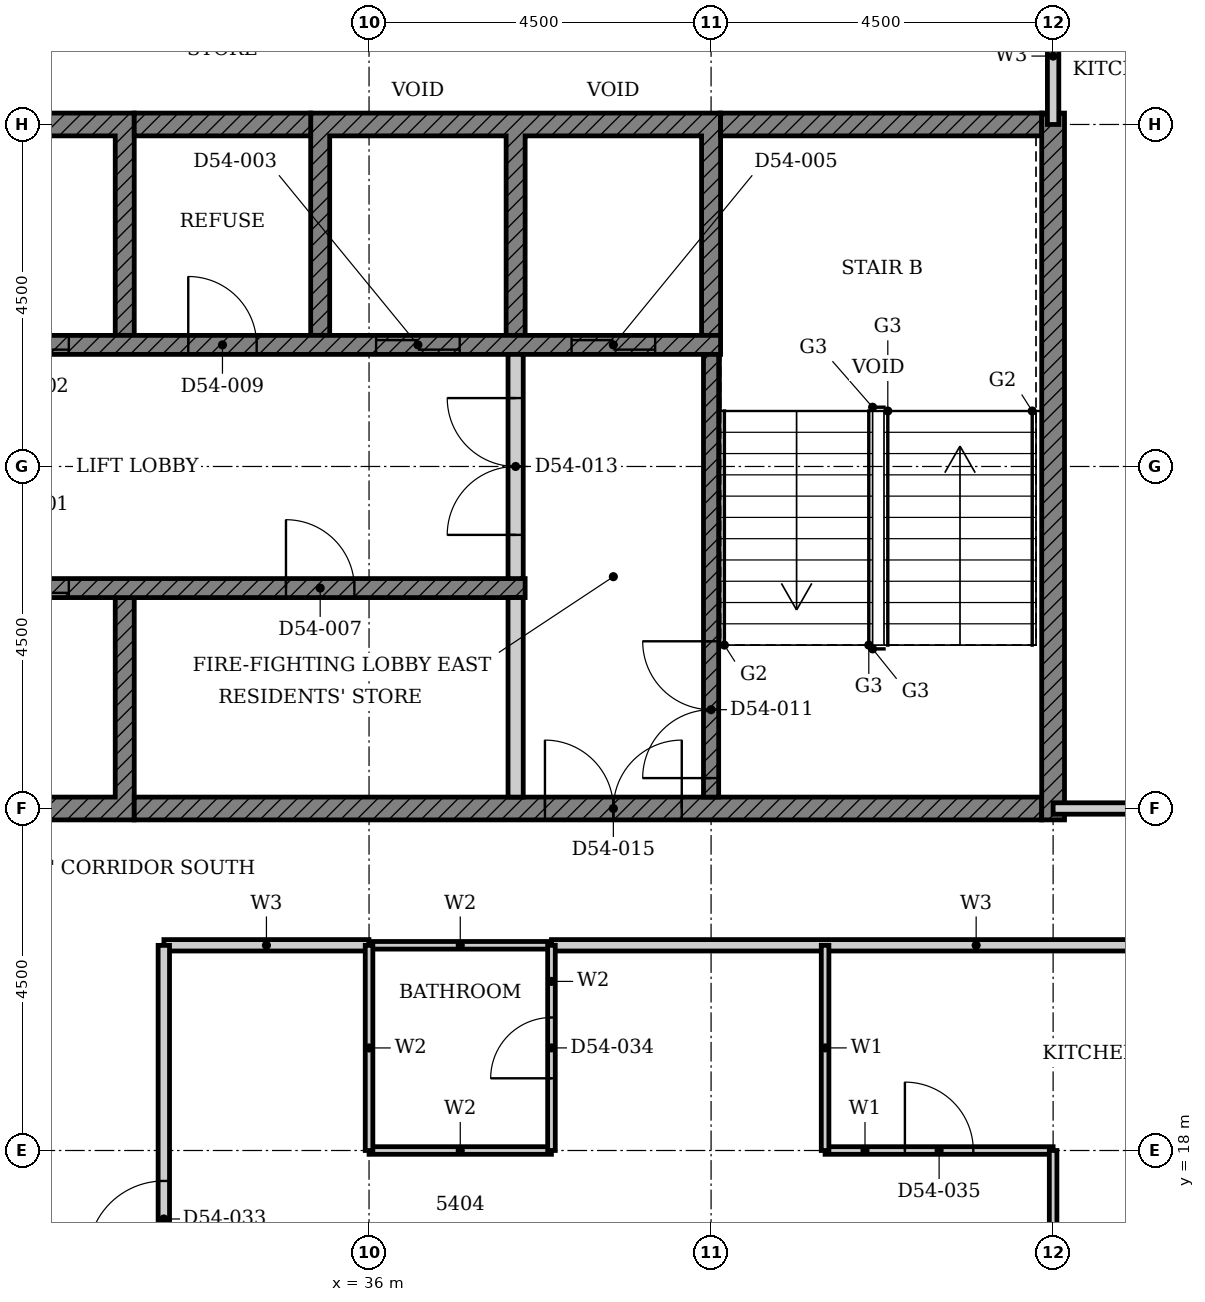
"""IFC4 building model, lengths in metres.
Left out: names, types, materials, properties, quantities, classifications, styles, units other than length and angle.
Written with IfcOpenShell. Run it as: python <this file> out.ifc"""

import sys

from ifc_helpers import new_model, si_unit, direction, frame, frame_2d, origin, place, context, subcontext, project, spatial, polyline, rectangle, outline, extrude, element, fill, save


model = new_model("IFC4")
c1 = context("Model", 3, precision=1e-05, world=origin(), true_north=direction((0.0, 1.0)))
c2 = subcontext(c1, "Body", "Model", "MODEL_VIEW")
j1 = project(units=[si_unit("LENGTHUNIT", "METRE"), si_unit("PLANEANGLEUNIT", "RADIAN")], contexts=[c1])
p1 = place(None, origin())
s1 = spatial("IfcSite", under=j1, at=p1, CompositionType="ELEMENT")
p2 = place(p1, origin())
s2 = spatial("IfcBuilding", under=s1, at=p2, CompositionType="ELEMENT")
p3 = place(p2, frame((0.0, 0.0, 214.6)))
s3 = spatial("IfcBuildingStorey", under=s2, at=p3, CompositionType="ELEMENT", Elevation=214.6)
p4 = place(p3, origin())
e1 = element("IfcWall", 1, at=p4, inside=s3, PredefinedType="SHEAR", context=c2, shape_type="SweptSolid", body=[
    extrude(outline(polyline([(27.518, 22.35), (32.911, 22.35), (32.911, 25.275), (32.661, 25.275), (32.661, 22.65), (30.339, 22.65), (30.339, 25.275), (30.089, 25.275), (30.089, 22.65), (27.768, 22.65), (27.768, 25.275), (27.518, 25.275), (27.518, 22.35)])), origin(), (0.0, 0.0, 1.0), 3.4),
])
p5 = place(p3, origin())
e2 = element("IfcWall", 2, at=p5, inside=s3, PredefinedType="SHEAR", context=c2, shape_type="SweptSolid", body=[
    extrude(outline(polyline([(27.518, 28.725), (27.768, 28.725), (27.768, 31.35), (30.089, 31.35), (30.089, 28.725), (30.339, 28.725), (30.339, 31.35), (32.661, 31.35), (32.661, 28.725), (32.911, 28.725), (32.911, 31.65), (27.518, 31.65), (27.518, 28.725)])), origin(), (0.0, 0.0, 1.0), 3.4),
])
p6 = place(p3, origin())
e3 = element("IfcWall", 3, at=p6, inside=s3, PredefinedType="SHEAR", context=c2, shape_type="SweptSolid", body=[
    extrude(outline(polyline([(35.232, 28.725), (35.482, 28.725), (35.482, 31.35), (37.803, 31.35), (37.803, 28.725), (38.053, 28.725), (38.053, 31.35), (40.375, 31.35), (40.375, 28.725), (40.625, 28.725), (40.625, 31.65), (35.232, 31.65), (35.232, 28.725)])), origin(), (0.0, 0.0, 1.0), 3.4),
])
p7 = place(p3, frame((32.911, 22.5, 0.0), z_axis=(0.0, 0.0, 1.0), x_axis=(1.0, 0.0, 0.0)))
e4 = element("IfcWall", 4, at=p7, inside=s3, PredefinedType="SHEAR", context=c2, shape_type="SweptSolid", body=[
    extrude(rectangle(XDim=11.939, YDim=0.3, at=frame_2d((5.97, 0.0))), origin(), (0.0, 0.0, 1.0), 3.4),
])
p8 = place(p7, frame((5.404, 0.0, 0.0)))
e5 = element("IfcOpeningElement", 5, at=p8, cuts=e4, PredefinedType="OPENING", context=c2, shape_type="SweptSolid", body=[
    extrude(rectangle(XDim=1.8, YDim=2.1, at=frame_2d((0.9, 1.05))), frame((0.0, 0.16, 0.0), z_axis=(0.0, -1.0, 0.0), x_axis=(1.0, 0.0, 0.0)), (0.0, 0.0, 1.0), 0.32),
])
p9 = place(p3, frame((32.911, 31.5, 0.0), z_axis=(0.0, 0.0, 1.0), x_axis=(1.0, 0.0, 0.0)))
e6 = element("IfcWall", 6, at=p9, inside=s3, PredefinedType="SHEAR", context=c2, shape_type="SweptSolid", body=[
    extrude(rectangle(XDim=2.322, YDim=0.3, at=frame_2d((1.161, 0.0))), origin(), (0.0, 0.0, 1.0), 3.4),
])
p10 = place(p3, frame((40.625, 31.5, 0.0), z_axis=(0.0, 0.0, 1.0), x_axis=(1.0, 0.0, 0.0)))
e7 = element("IfcWall", 7, at=p10, inside=s3, PredefinedType="SHEAR", context=c2, shape_type="SweptSolid", body=[
    extrude(rectangle(XDim=4.225, YDim=0.3, at=frame_2d((2.113, 0.0))), origin(), (0.0, 0.0, 1.0), 3.4),
])
p11 = place(p3, frame((45.0, 22.35, 0.0), z_axis=(0.0, 0.0, 1.0), x_axis=(0.0, 1.0, 0.0)))
e8 = element("IfcWall", 8, at=p11, inside=s3, PredefinedType="SHEAR", context=c2, shape_type="SweptSolid", body=[
    extrude(rectangle(XDim=9.3, YDim=0.3, at=frame_2d((4.65, 0.0))), origin(), (0.0, 0.0, 1.0), 3.4),
])
p12 = place(p3, frame((22.375, 25.4, 0.0), z_axis=(0.0, 0.0, 1.0), x_axis=(1.0, 0.0, 0.0)))
e9 = element("IfcWall", 9, at=p12, inside=s3, PredefinedType="SHEAR", context=c2, shape_type="SweptSolid", body=[
    extrude(rectangle(XDim=15.678, YDim=0.25, at=frame_2d((7.839, 0.0))), origin(), (0.0, 0.0, 1.0), 3.4),
])
p13 = place(p12, frame((8.575, 0.0, 0.0)))
e10 = element("IfcOpeningElement", 10, at=p13, cuts=e9, PredefinedType="OPENING", context=c2, shape_type="SweptSolid", body=[
    extrude(rectangle(XDim=1.1, YDim=2.1, at=frame_2d((0.55, 1.05))), frame((0.0, 0.135, 0.0), z_axis=(0.0, -1.0, 0.0), x_axis=(1.0, 0.0, 0.0)), (0.0, 0.0, 1.0), 0.27),
])
p14 = place(p12, frame((0.861, 0.0, 0.0)))
e11 = element("IfcOpeningElement", 11, at=p14, cuts=e9, PredefinedType="OPENING", context=c2, shape_type="SweptSolid", body=[
    extrude(rectangle(XDim=1.1, YDim=2.1, at=frame_2d((0.55, 1.05))), frame((0.0, 0.135, 0.0), z_axis=(0.0, -1.0, 0.0), x_axis=(1.0, 0.0, 0.0)), (0.0, 0.0, 1.0), 0.27),
])
p15 = place(p12, frame((3.532, 0.0, 0.0)))
e12 = element("IfcOpeningElement", 12, at=p15, cuts=e9, PredefinedType="OPENING", context=c2, shape_type="SweptSolid", body=[
    extrude(rectangle(XDim=0.9, YDim=2.1, at=frame_2d((0.45, 1.05))), frame((0.0, 0.135, 0.0), z_axis=(0.0, -1.0, 0.0), x_axis=(1.0, 0.0, 0.0)), (0.0, 0.0, 1.0), 0.27),
])
p16 = place(p12, frame((12.532, 0.0, 0.0)))
e13 = element("IfcOpeningElement", 13, at=p16, cuts=e9, PredefinedType="OPENING", context=c2, shape_type="SweptSolid", body=[
    extrude(rectangle(XDim=0.9, YDim=2.1, at=frame_2d((0.45, 1.05))), frame((0.0, 0.135, 0.0), z_axis=(0.0, -1.0, 0.0), x_axis=(1.0, 0.0, 0.0)), (0.0, 0.0, 1.0), 0.27),
])
p17 = place(p3, frame((24.947, 28.6, 0.0), z_axis=(0.0, 0.0, 1.0), x_axis=(1.0, 0.0, 0.0)))
e14 = element("IfcWall", 14, at=p17, inside=s3, PredefinedType="SHEAR", context=c2, shape_type="SweptSolid", body=[
    extrude(rectangle(XDim=15.678, YDim=0.25, at=frame_2d((7.839, 0.0))), origin(), (0.0, 0.0, 1.0), 3.4),
])
p18 = place(p17, frame((6.004, 0.0, 0.0)))
e15 = element("IfcOpeningElement", 15, at=p18, cuts=e14, PredefinedType="OPENING", context=c2, shape_type="SweptSolid", body=[
    extrude(rectangle(XDim=1.1, YDim=2.1, at=frame_2d((0.55, 1.05))), frame((0.0, 0.135, 0.0), z_axis=(0.0, -1.0, 0.0), x_axis=(1.0, 0.0, 0.0)), (0.0, 0.0, 1.0), 0.27),
])
p19 = place(p17, frame((11.146, 0.0, 0.0)))
e16 = element("IfcOpeningElement", 16, at=p19, cuts=e14, PredefinedType="OPENING", context=c2, shape_type="SweptSolid", body=[
    extrude(rectangle(XDim=1.1, YDim=2.1, at=frame_2d((0.55, 1.05))), frame((0.0, 0.135, 0.0), z_axis=(0.0, -1.0, 0.0), x_axis=(1.0, 0.0, 0.0)), (0.0, 0.0, 1.0), 0.27),
])
p20 = place(p17, frame((13.718, 0.0, 0.0)))
e17 = element("IfcOpeningElement", 17, at=p20, cuts=e14, PredefinedType="OPENING", context=c2, shape_type="SweptSolid", body=[
    extrude(rectangle(XDim=1.1, YDim=2.1, at=frame_2d((0.55, 1.05))), frame((0.0, 0.135, 0.0), z_axis=(0.0, -1.0, 0.0), x_axis=(1.0, 0.0, 0.0)), (0.0, 0.0, 1.0), 0.27),
])
p21 = place(p17, frame((0.961, 0.0, 0.0)))
e18 = element("IfcOpeningElement", 18, at=p21, cuts=e14, PredefinedType="OPENING", context=c2, shape_type="SweptSolid", body=[
    extrude(rectangle(XDim=0.9, YDim=2.1, at=frame_2d((0.45, 1.05))), frame((0.0, 0.135, 0.0), z_axis=(0.0, -1.0, 0.0), x_axis=(1.0, 0.0, 0.0)), (0.0, 0.0, 1.0), 0.27),
])
p22 = place(p17, frame((8.675, 0.0, 0.0)))
e19 = element("IfcOpeningElement", 19, at=p22, cuts=e14, PredefinedType="OPENING", context=c2, shape_type="SweptSolid", body=[
    extrude(rectangle(XDim=0.9, YDim=2.1, at=frame_2d((0.45, 1.05))), frame((0.0, 0.135, 0.0), z_axis=(0.0, -1.0, 0.0), x_axis=(1.0, 0.0, 0.0)), (0.0, 0.0, 1.0), 0.27),
])
p23 = place(p3, frame((37.928, 22.65, 0.0), z_axis=(0.0, 0.0, 1.0), x_axis=(0.0, 1.0, 0.0)))
e20 = element("IfcWall", 20, at=p23, inside=s3, PredefinedType="PARTITIONING", context=c2, shape_type="SweptSolid", body=[
    extrude(rectangle(XDim=2.625, YDim=0.2, at=frame_2d((1.312, 0.0))), origin(), (0.0, 0.0, 1.0), 3.4),
])
p24 = place(p3, frame((40.5, 22.65, 0.0), z_axis=(0.0, 0.0, 1.0), x_axis=(0.0, 1.0, 0.0)))
e21 = element("IfcWall", 21, at=p24, inside=s3, PredefinedType="SHEAR", context=c2, shape_type="SweptSolid", body=[
    extrude(rectangle(XDim=5.825, YDim=0.2, at=frame_2d((2.913, 0.0))), origin(), (0.0, 0.0, 1.0), 3.4),
])
p25 = place(p24, frame((0.25, 0.0, 0.0)))
e22 = element("IfcOpeningElement", 22, at=p25, cuts=e21, PredefinedType="OPENING", context=c2, shape_type="SweptSolid", body=[
    extrude(rectangle(XDim=1.8, YDim=2.1, at=frame_2d((0.9, 1.05))), frame((0.0, 0.11, 0.0), z_axis=(0.0, -1.0, 0.0), x_axis=(1.0, 0.0, 0.0)), (0.0, 0.0, 1.0), 0.22),
])
p26 = place(p3, frame((37.928, 25.525, 0.0), z_axis=(0.0, 0.0, 1.0), x_axis=(0.0, 1.0, 0.0)))
e23 = element("IfcWall", 23, at=p26, inside=s3, PredefinedType="PARTITIONING", context=c2, shape_type="SweptSolid", body=[
    extrude(rectangle(XDim=2.95, YDim=0.2, at=frame_2d((1.475, 0.0))), origin(), (0.0, 0.0, 1.0), 3.4),
])
p27 = place(p26, frame((0.575, 0.0, 0.0)))
e24 = element("IfcOpeningElement", 24, at=p27, cuts=e23, PredefinedType="OPENING", context=c2, shape_type="SweptSolid", body=[
    extrude(rectangle(XDim=1.8, YDim=2.1, at=frame_2d((0.9, 1.05))), frame((0.0, 0.11, 0.0), z_axis=(0.0, -1.0, 0.0), x_axis=(1.0, 0.0, 0.0)), (0.0, 0.0, 1.0), 0.22),
])
p28 = place(p3, frame((33.301, 20.7, 0.0), z_axis=(0.0, 0.0, 1.0), x_axis=(1.0, 0.0, 0.0)))
e25 = element("IfcWall", 25, at=p28, inside=s3, PredefinedType="PARTITIONING", context=c2, shape_type="SweptSolid", body=[
    extrude(rectangle(XDim=2.698, YDim=0.15, at=frame_2d((1.349, 0.0))), origin(), (0.0, 0.0, 1.0), 3.4),
])
p29 = place(p3, frame((38.4, 20.7, 0.0), z_axis=(0.0, 0.0, 1.0), x_axis=(1.0, 0.0, 0.0)))
e26 = element("IfcWall", 26, at=p29, inside=s3, PredefinedType="PARTITIONING", context=c2, shape_type="SweptSolid", body=[
    extrude(rectangle(XDim=11.175, YDim=0.15, at=frame_2d((5.587, 0.0))), origin(), (0.0, 0.0, 1.0), 3.4),
])
p30 = place(p3, frame((45.0, 22.5, 0.0), z_axis=(0.0, 0.0, 1.0), x_axis=(1.0, 0.0, 0.0)))
e27 = element("IfcWall", 27, at=p30, inside=s3, PredefinedType="PARTITIONING", context=c2, shape_type="SweptSolid", body=[
    extrude(rectangle(XDim=4.765, YDim=0.15, at=frame_2d((2.382, 0.0))), origin(), (0.0, 0.0, 1.0), 3.4),
])
p31 = place(p30, frame((1.75, 0.0, 0.0)))
e28 = element("IfcOpeningElement", 28, at=p31, cuts=e27, PredefinedType="OPENING", context=c2, shape_type="SweptSolid", body=[
    extrude(rectangle(XDim=1.0, YDim=2.2, at=frame_2d((0.5, 1.1))), frame((0.0, 0.085, 0.0), z_axis=(0.0, -1.0, 0.0), x_axis=(1.0, 0.0, 0.0)), (0.0, 0.0, 1.0), 0.17),
])
p32 = place(p3, frame((33.3, 6.9, 0.0), z_axis=(0.0, 0.0, 1.0), x_axis=(0.0, 1.0, 0.0)))
e29 = element("IfcWall", 29, at=p32, inside=s3, PredefinedType="PARTITIONING", context=c2, shape_type="SweptSolid", body=[
    extrude(rectangle(XDim=13.799, YDim=0.15, at=frame_2d((6.899, 0.0))), origin(), (0.0, 0.0, 1.0), 3.4),
])
p33 = place(p32, frame((9.699, 0.0, 0.0)))
e30 = element("IfcOpeningElement", 30, at=p33, cuts=e29, PredefinedType="OPENING", context=c2, shape_type="SweptSolid", body=[
    extrude(rectangle(XDim=1.0, YDim=2.2, at=frame_2d((0.5, 1.1))), frame((0.0, 0.085, 0.0), z_axis=(0.0, -1.0, 0.0), x_axis=(1.0, 0.0, 0.0)), (0.0, 0.0, 1.0), 0.17),
])
p34 = place(p32, frame((1.3, 0.0, 0.0)))
e31 = element("IfcOpeningElement", 31, at=p34, cuts=e29, PredefinedType="OPENING", context=c2, shape_type="SweptSolid", body=[
    extrude(rectangle(XDim=1.0, YDim=2.2, at=frame_2d((0.5, 1.1))), frame((0.0, 0.085, 0.0), z_axis=(0.0, -1.0, 0.0), x_axis=(1.0, 0.0, 0.0)), (0.0, 0.0, 1.0), 0.17),
])
p35 = place(p3, frame((45.0, 31.5, 0.0), z_axis=(0.0, 0.0, 1.0), x_axis=(0.0, 1.0, 0.0)))
e32 = element("IfcWall", 32, at=p35, inside=s3, PredefinedType="PARTITIONING", context=c2, shape_type="SweptSolid", body=[
    extrude(rectangle(XDim=1.8, YDim=0.15, at=frame_2d((0.9, 0.0))), origin(), (0.0, 0.0, 1.0), 3.4),
])
p36 = place(p3, frame((42.0, 18.0, 0.0), z_axis=(0.0, 0.0, 1.0), x_axis=(1.0, 0.0, 0.0)))
e33 = element("IfcWall", 33, at=p36, inside=s3, PredefinedType="PARTITIONING", context=c2, shape_type="SweptSolid", body=[
    extrude(rectangle(XDim=3.0, YDim=0.1, at=frame_2d((1.5, 0.0))), origin(), (0.0, 0.0, 1.0), 3.4),
])
p37 = place(p36, frame((1.05, 0.0, 0.0)))
e34 = element("IfcOpeningElement", 34, at=p37, cuts=e33, PredefinedType="OPENING", context=c2, shape_type="SweptSolid", body=[
    extrude(rectangle(XDim=0.9, YDim=2.1, at=frame_2d((0.45, 1.05))), frame((0.0, 0.06, 0.0), z_axis=(0.0, -1.0, 0.0), x_axis=(1.0, 0.0, 0.0)), (0.0, 0.0, 1.0), 0.12),
])
p38 = place(p3, frame((42.0, 18.0, 0.0), z_axis=(0.0, 0.0, 1.0), x_axis=(0.0, 1.0, 0.0)))
e35 = element("IfcWall", 35, at=p38, inside=s3, PredefinedType="PARTITIONING", context=c2, shape_type="SweptSolid", body=[
    extrude(rectangle(XDim=2.7, YDim=0.1, at=frame_2d((1.35, 0.0))), origin(), (0.0, 0.0, 1.0), 3.4),
])
p39 = place(p3, frame((45.0, 15.56, 0.0), z_axis=(0.0, 0.0, 1.0), x_axis=(0.0, 1.0, 0.0)))
e36 = element("IfcWall", 36, at=p39, inside=s3, PredefinedType="PARTITIONING", context=c2, shape_type="SweptSolid", body=[
    extrude(rectangle(XDim=2.44, YDim=0.1, at=frame_2d((1.22, 0.0))), origin(), (0.0, 0.0, 1.0), 3.4),
])
for number, where, z_axis, x_axis in (
    (37, (36.0, 18.0, 0.0), (0.0, 0.0, 1.0), (1.0, 0.0, 0.0)),
    (38, (36.0, 20.7, 0.0), (0.0, 0.0, 1.0), (1.0, 0.0, 0.0)),
):
    element("IfcWall", number, at=place(p3, frame(where, z_axis=z_axis, x_axis=x_axis)), inside=s3, PredefinedType="PARTITIONING", context=c2, shape_type="SweptSolid", body=[
        extrude(rectangle(XDim=2.4, YDim=0.1, at=frame_2d((1.2, 0.0))), origin(), (0.0, 0.0, 1.0), 3.4),
    ])
p40 = place(p3, frame((36.0, 18.0, 0.0), z_axis=(0.0, 0.0, 1.0), x_axis=(0.0, 1.0, 0.0)))
e39 = element("IfcWall", 39, at=p40, inside=s3, PredefinedType="PARTITIONING", context=c2, shape_type="SweptSolid", body=[
    extrude(rectangle(XDim=2.699, YDim=0.1, at=frame_2d((1.35, 0.0))), origin(), (0.0, 0.0, 1.0), 3.4),
])
p41 = place(p3, frame((38.4, 18.0, 0.0), z_axis=(0.0, 0.0, 1.0), x_axis=(0.0, 1.0, 0.0)))
e40 = element("IfcWall", 40, at=p41, inside=s3, PredefinedType="PARTITIONING", context=c2, shape_type="SweptSolid", body=[
    extrude(rectangle(XDim=2.7, YDim=0.1, at=frame_2d((1.35, 0.0))), origin(), (0.0, 0.0, 1.0), 3.4),
])
p42 = place(p41, frame((0.95, 0.0, 0.0)))
e41 = element("IfcOpeningElement", 41, at=p42, cuts=e40, PredefinedType="OPENING", context=c2, shape_type="SweptSolid", body=[
    extrude(rectangle(XDim=0.8, YDim=2.1, at=frame_2d((0.4, 1.05))), frame((0.0, 0.06, 0.0), z_axis=(0.0, -1.0, 0.0), x_axis=(1.0, 0.0, 0.0)), (0.0, 0.0, 1.0), 0.12),
])
p43 = place(p13, origin())
e42 = element("IfcDoor", 42, at=p43, inside=s3, OperationType="DOUBLE_DOOR_SLIDING", PredefinedType="DOOR", context=c2, shape_type="SweptSolid", body=[
    extrude(rectangle(XDim=1.1, YDim=2.1, at=frame_2d((0.55, 1.05))), frame((0.0, 0.025, 0.0), z_axis=(0.0, -1.0, 0.0), x_axis=(1.0, 0.0, 0.0)), (0.0, 0.0, 1.0), 0.05),
])
fill(e10, e42)
p44 = place(p18, origin())
e43 = element("IfcDoor", 43, at=p44, inside=s3, OperationType="DOUBLE_DOOR_SLIDING", PredefinedType="DOOR", context=c2, shape_type="SweptSolid", body=[
    extrude(rectangle(XDim=1.1, YDim=2.1, at=frame_2d((0.55, 1.05))), frame((0.0, 0.025, 0.0), z_axis=(0.0, -1.0, 0.0), x_axis=(1.0, 0.0, 0.0)), (0.0, 0.0, 1.0), 0.05),
])
fill(e15, e43)
p45 = place(p19, origin())
e44 = element("IfcDoor", 44, at=p45, inside=s3, OperationType="DOUBLE_DOOR_SLIDING", PredefinedType="DOOR", context=c2, shape_type="SweptSolid", body=[
    extrude(rectangle(XDim=1.1, YDim=2.1, at=frame_2d((0.55, 1.05))), frame((0.0, 0.025, 0.0), z_axis=(0.0, -1.0, 0.0), x_axis=(1.0, 0.0, 0.0)), (0.0, 0.0, 1.0), 0.05),
])
fill(e16, e44)
p46 = place(p20, origin())
e45 = element("IfcDoor", 45, at=p46, inside=s3, OperationType="DOUBLE_DOOR_SLIDING", PredefinedType="DOOR", context=c2, shape_type="SweptSolid", body=[
    extrude(rectangle(XDim=1.1, YDim=2.1, at=frame_2d((0.55, 1.05))), frame((0.0, 0.025, 0.0), z_axis=(0.0, -1.0, 0.0), x_axis=(1.0, 0.0, 0.0)), (0.0, 0.0, 1.0), 0.05),
])
fill(e17, e45)
p47 = place(p16, origin())
e46 = element("IfcDoor", 46, at=p47, inside=s3, OperationType="SINGLE_SWING_LEFT", PredefinedType="DOOR", context=c2, shape_type="SweptSolid", body=[
    extrude(rectangle(XDim=0.9, YDim=2.1, at=frame_2d((0.45, 1.05))), frame((0.0, 0.025, 0.0), z_axis=(0.0, -1.0, 0.0), x_axis=(1.0, 0.0, 0.0)), (0.0, 0.0, 1.0), 0.05),
])
fill(e13, e46)
p48 = place(p22, origin())
e47 = element("IfcDoor", 47, at=p48, inside=s3, OperationType="SINGLE_SWING_LEFT", PredefinedType="DOOR", context=c2, shape_type="SweptSolid", body=[
    extrude(rectangle(XDim=0.9, YDim=2.1, at=frame_2d((0.45, 1.05))), frame((0.0, 0.025, 0.0), z_axis=(0.0, -1.0, 0.0), x_axis=(1.0, 0.0, 0.0)), (0.0, 0.0, 1.0), 0.05),
])
fill(e19, e47)
p49 = place(p25, origin())
e48 = element("IfcDoor", 48, at=p49, inside=s3, OperationType="DOUBLE_DOOR_SINGLE_SWING", PredefinedType="DOOR", context=c2, shape_type="SweptSolid", body=[
    extrude(rectangle(XDim=1.8, YDim=2.1, at=frame_2d((0.9, 1.05))), frame((0.0, 0.025, 0.0), z_axis=(0.0, -1.0, 0.0), x_axis=(1.0, 0.0, 0.0)), (0.0, 0.0, 1.0), 0.05),
])
fill(e22, e48)
p50 = place(p27, origin())
e49 = element("IfcDoor", 49, at=p50, inside=s3, OperationType="DOUBLE_DOOR_SINGLE_SWING", PredefinedType="DOOR", context=c2, shape_type="SweptSolid", body=[
    extrude(rectangle(XDim=1.8, YDim=2.1, at=frame_2d((0.9, 1.05))), frame((0.0, 0.025, 0.0), z_axis=(0.0, -1.0, 0.0), x_axis=(1.0, 0.0, 0.0)), (0.0, 0.0, 1.0), 0.05),
])
fill(e24, e49)
p51 = place(p8, origin())
e50 = element("IfcDoor", 50, at=p51, inside=s3, OperationType="DOUBLE_DOOR_SINGLE_SWING", PredefinedType="DOOR", context=c2, shape_type="SweptSolid", body=[
    extrude(rectangle(XDim=1.8, YDim=2.1, at=frame_2d((0.9, 1.05))), frame((0.0, 0.025, 0.0), z_axis=(0.0, -1.0, 0.0), x_axis=(1.0, 0.0, 0.0)), (0.0, 0.0, 1.0), 0.05),
])
fill(e5, e50)
p52 = place(p33, origin())
e51 = element("IfcDoor", 51, at=p52, inside=s3, OperationType="SINGLE_SWING_LEFT", PredefinedType="DOOR", context=c2, shape_type="SweptSolid", body=[
    extrude(rectangle(XDim=1.0, YDim=2.2, at=frame_2d((0.5, 1.1))), frame((0.0, 0.025, 0.0), z_axis=(0.0, -1.0, 0.0), x_axis=(1.0, 0.0, 0.0)), (0.0, 0.0, 1.0), 0.05),
])
fill(e30, e51)
p53 = place(p42, origin())
e52 = element("IfcDoor", 52, at=p53, inside=s3, OperationType="SINGLE_SWING_RIGHT", PredefinedType="DOOR", context=c2, shape_type="SweptSolid", body=[
    extrude(rectangle(XDim=0.8, YDim=2.1, at=frame_2d((0.4, 1.05))), frame((0.0, 0.025, 0.0), z_axis=(0.0, -1.0, 0.0), x_axis=(1.0, 0.0, 0.0)), (0.0, 0.0, 1.0), 0.05),
])
fill(e41, e52)
p54 = place(p37, origin())
e53 = element("IfcDoor", 53, at=p54, inside=s3, OperationType="SINGLE_SWING_LEFT", PredefinedType="DOOR", context=c2, shape_type="SweptSolid", body=[
    extrude(rectangle(XDim=0.9, YDim=2.1, at=frame_2d((0.45, 1.05))), frame((0.0, 0.025, 0.0), z_axis=(0.0, -1.0, 0.0), x_axis=(1.0, 0.0, 0.0)), (0.0, 0.0, 1.0), 0.05),
])
fill(e34, e53)
save(model, sys.argv[1])
